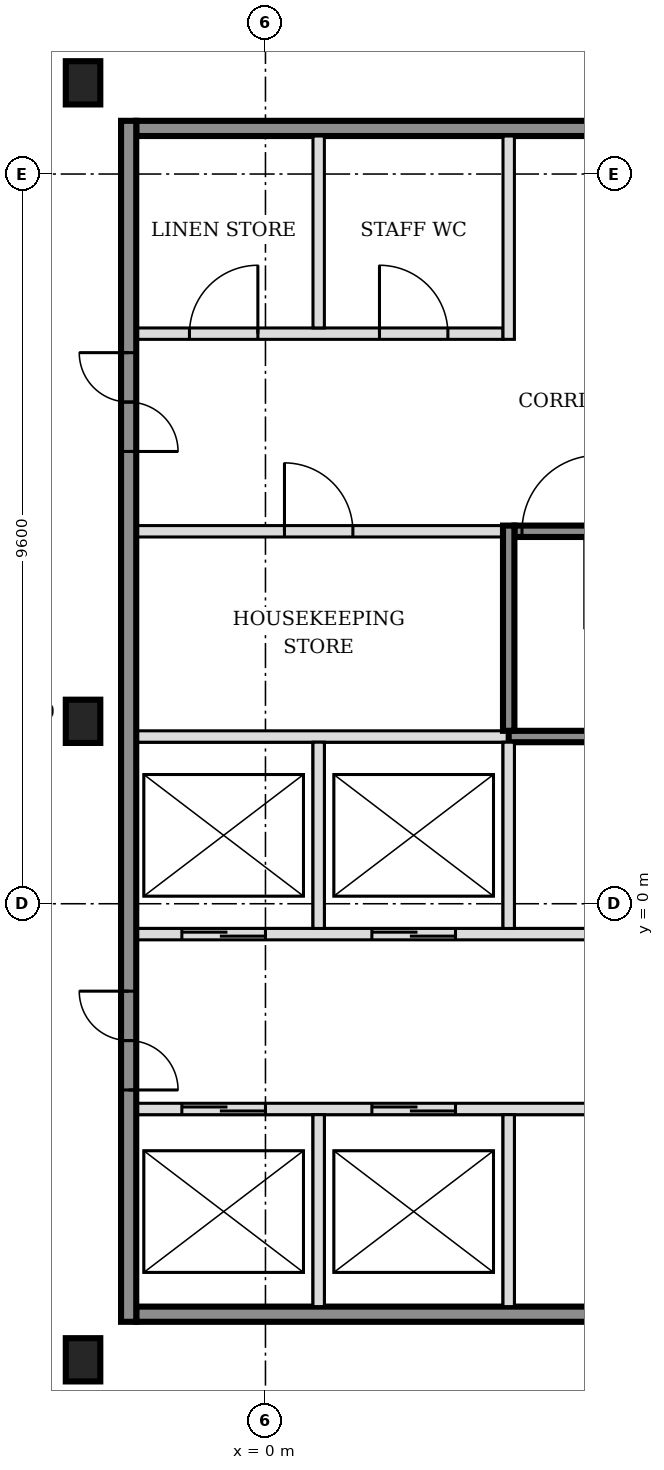
"""IFC4 building model, lengths in metres.
Left out: names, types, materials, properties, quantities, classifications, styles, units other than length and angle.
Written with IfcOpenShell. Run it as: python <this file> out.ifc"""

import sys

from ifc_helpers import new_model, si_unit, direction, frame, frame_2d, origin, origin_2d, place, context, subcontext, project, spatial, rectangle, i_section, extrude, element, fill, save


model = new_model("IFC4")
c1 = context("Model", 3, precision=1e-05, world=origin(), true_north=direction((0.0, 1.0)))
c2 = subcontext(c1, "Body", "Model", "MODEL_VIEW")
j1 = project(units=[si_unit("LENGTHUNIT", "METRE"), si_unit("PLANEANGLEUNIT", "RADIAN")], contexts=[c1])
p1 = place(None, origin())
s1 = spatial("IfcSite", under=j1, at=p1, CompositionType="ELEMENT")
p2 = place(p1, origin())
s2 = spatial("IfcBuilding", under=s1, at=p2, CompositionType="ELEMENT")
p3 = place(p2, frame((0.0, 0.0, 58.2)))
s3 = spatial("IfcBuildingStorey", under=s2, at=p3, CompositionType="ELEMENT", Elevation=58.2)
for number, where, z_axis, x_axis in (
    (1, (-2.4, -6.0, -0.15), (0.0, 0.0, 1.0), (1.0, 0.0, 0.0)),
    (2, (-2.4, 2.4, -0.15), (0.0, 0.0, 1.0), (1.0, 0.0, 0.0)),
    (3, (-2.4, 10.8, -0.15), (0.0, 0.0, 1.0), (1.0, 0.0, 0.0)),
):
    element("IfcColumn", number, at=place(p3, frame(where, z_axis=z_axis, x_axis=x_axis)), inside=s3, PredefinedType="COLUMN", context=c2, shape_type="SweptSolid", body=[
        extrude(i_section(OverallWidth=0.454, OverallDepth=0.569, WebThickness=0.078, FlangeThickness=0.125, FilletRadius=0.015, at=origin_2d()), origin(), (0.0, 0.0, 1.0), 3.6),
    ])
p4 = place(p3, frame((-1.7, -5.4, 0.0), z_axis=(0.0, 0.0, 1.0), x_axis=(1.0, 0.0, 0.0)))
e4 = element("IfcWall", 4, at=p4, inside=s3, PredefinedType="SOLIDWALL", context=c2, shape_type="SweptSolid", body=[
    extrude(rectangle(XDim=7.9, YDim=0.2, at=frame_2d((3.95, 0.0))), origin(), (0.0, 0.0, 1.0), 3.45),
])
p5 = place(p3, frame((-1.7, -2.7, 0.0), z_axis=(0.0, 0.0, 1.0), x_axis=(1.0, 0.0, 0.0)))
e5 = element("IfcWall", 5, at=p5, inside=s3, PredefinedType="SOLIDWALL", context=c2, shape_type="SweptSolid", body=[
    extrude(rectangle(XDim=7.9, YDim=0.15, at=frame_2d((3.95, 0.0))), origin(), (0.0, 0.0, 1.0), 3.45),
])
p6 = place(p5, frame((0.6, 0.0, 0.0)))
e6 = element("IfcOpeningElement", 6, at=p6, cuts=e5, PredefinedType="OPENING", context=c2, shape_type="SweptSolid", body=[
    extrude(rectangle(XDim=1.1, YDim=2.1, at=frame_2d((0.55, 1.05))), frame((0.0, 0.085, 0.0), z_axis=(0.0, -1.0, 0.0), x_axis=(1.0, 0.0, 0.0)), (0.0, 0.0, 1.0), 0.17),
])
p7 = place(p5, frame((3.1, 0.0, 0.0)))
e7 = element("IfcOpeningElement", 7, at=p7, cuts=e5, PredefinedType="OPENING", context=c2, shape_type="SweptSolid", body=[
    extrude(rectangle(XDim=1.1, YDim=2.1, at=frame_2d((0.55, 1.05))), frame((0.0, 0.085, 0.0), z_axis=(0.0, -1.0, 0.0), x_axis=(1.0, 0.0, 0.0)), (0.0, 0.0, 1.0), 0.17),
])
p8 = place(p3, frame((-1.7, -0.4, 0.0), z_axis=(0.0, 0.0, 1.0), x_axis=(1.0, 0.0, 0.0)))
e8 = element("IfcWall", 8, at=p8, inside=s3, PredefinedType="SOLIDWALL", context=c2, shape_type="SweptSolid", body=[
    extrude(rectangle(XDim=15.925, YDim=0.15, at=frame_2d((7.962, 0.0))), origin(), (0.0, 0.0, 1.0), 3.45),
])
p9 = place(p8, frame((0.6, 0.0, 0.0)))
e9 = element("IfcOpeningElement", 9, at=p9, cuts=e8, PredefinedType="OPENING", context=c2, shape_type="SweptSolid", body=[
    extrude(rectangle(XDim=1.1, YDim=2.1, at=frame_2d((0.55, 1.05))), frame((0.0, 0.085, 0.0), z_axis=(0.0, -1.0, 0.0), x_axis=(1.0, 0.0, 0.0)), (0.0, 0.0, 1.0), 0.17),
])
p10 = place(p8, frame((3.1, 0.0, 0.0)))
e10 = element("IfcOpeningElement", 10, at=p10, cuts=e8, PredefinedType="OPENING", context=c2, shape_type="SweptSolid", body=[
    extrude(rectangle(XDim=1.1, YDim=2.1, at=frame_2d((0.55, 1.05))), frame((0.0, 0.085, 0.0), z_axis=(0.0, -1.0, 0.0), x_axis=(1.0, 0.0, 0.0)), (0.0, 0.0, 1.0), 0.17),
])
p11 = place(p8, frame((11.575, 0.0, 0.0)))
e11 = element("IfcOpeningElement", 11, at=p11, cuts=e8, PredefinedType="OPENING", context=c2, shape_type="SweptSolid", body=[
    extrude(rectangle(XDim=1.2, YDim=2.1, at=frame_2d((0.6, 1.05))), frame((0.0, 0.085, 0.0), z_axis=(0.0, -1.0, 0.0), x_axis=(1.0, 0.0, 0.0)), (0.0, 0.0, 1.0), 0.17),
])
p12 = place(p8, frame((14.125, 0.0, 0.0)))
e12 = element("IfcOpeningElement", 12, at=p12, cuts=e8, PredefinedType="OPENING", context=c2, shape_type="SweptSolid", body=[
    extrude(rectangle(XDim=1.2, YDim=2.1, at=frame_2d((0.6, 1.05))), frame((0.0, 0.085, 0.0), z_axis=(0.0, -1.0, 0.0), x_axis=(1.0, 0.0, 0.0)), (0.0, 0.0, 1.0), 0.17),
])
p13 = place(p3, frame((-1.7, 2.2, 0.0), z_axis=(0.0, 0.0, 1.0), x_axis=(1.0, 0.0, 0.0)))
e13 = element("IfcWall", 13, at=p13, inside=s3, PredefinedType="SOLIDWALL", context=c2, shape_type="SweptSolid", body=[
    extrude(rectangle(XDim=4.9, YDim=0.15, at=frame_2d((2.45, 0.0))), origin(), (0.0, 0.0, 1.0), 3.45),
])
p14 = place(p3, frame((3.2, 2.2, 0.0), z_axis=(0.0, 0.0, 1.0), x_axis=(1.0, 0.0, 0.0)))
e14 = element("IfcWall", 14, at=p14, inside=s3, PredefinedType="SOLIDWALL", context=c2, shape_type="SweptSolid", body=[
    extrude(rectangle(XDim=6.5, YDim=0.15, at=frame_2d((3.25, 0.0))), origin(), (0.0, 0.0, 1.0), 3.45),
])
p15 = place(p3, frame((-1.7, 4.9, 0.0), z_axis=(0.0, 0.0, 1.0), x_axis=(1.0, 0.0, 0.0)))
e15 = element("IfcWall", 15, at=p15, inside=s3, PredefinedType="PARTITIONING", context=c2, shape_type="SweptSolid", body=[
    extrude(rectangle(XDim=4.825, YDim=0.15, at=frame_2d((2.413, 0.0))), origin(), (0.0, 0.0, 1.0), 3.45),
])
p16 = place(p15, frame((1.95, 0.0, 0.0)))
e16 = element("IfcOpeningElement", 16, at=p16, cuts=e15, PredefinedType="OPENING", context=c2, shape_type="SweptSolid", body=[
    extrude(rectangle(XDim=0.9, YDim=2.1, at=frame_2d((0.45, 1.05))), frame((0.0, 0.085, 0.0), z_axis=(0.0, -1.0, 0.0), x_axis=(1.0, 0.0, 0.0)), (0.0, 0.0, 1.0), 0.17),
])
p17 = place(p3, frame((3.275, 4.9, 0.0), z_axis=(0.0, 0.0, 1.0), x_axis=(1.0, 0.0, 0.0)))
e17 = element("IfcWall", 17, at=p17, inside=s3, PredefinedType="SOLIDWALL", context=c2, shape_type="SweptSolid", body=[
    extrude(rectangle(XDim=6.425, YDim=0.15, at=frame_2d((3.212, 0.0))), origin(), (0.0, 0.0, 1.0), 3.45),
])
p18 = place(p17, frame((0.1, 0.0, 0.0)))
e18 = element("IfcOpeningElement", 18, at=p18, cuts=e17, PredefinedType="OPENING", context=c2, shape_type="SweptSolid", body=[
    extrude(rectangle(XDim=1.0, YDim=2.1, at=frame_2d((0.5, 1.05))), frame((0.0, 0.085, 0.0), z_axis=(0.0, -1.0, 0.0), x_axis=(1.0, 0.0, 0.0)), (0.0, 0.0, 1.0), 0.17),
])
p19 = place(p3, frame((-1.7, 7.5, 0.0), z_axis=(0.0, 0.0, 1.0), x_axis=(1.0, 0.0, 0.0)))
e19 = element("IfcWall", 19, at=p19, inside=s3, PredefinedType="PARTITIONING", context=c2, shape_type="SweptSolid", body=[
    extrude(rectangle(XDim=4.825, YDim=0.15, at=frame_2d((2.413, 0.0))), origin(), (0.0, 0.0, 1.0), 3.45),
])
p20 = place(p19, frame((0.7, 0.0, 0.0)))
e20 = element("IfcOpeningElement", 20, at=p20, cuts=e19, PredefinedType="OPENING", context=c2, shape_type="SweptSolid", body=[
    extrude(rectangle(XDim=0.9, YDim=2.1, at=frame_2d((0.45, 1.05))), frame((0.0, 0.085, 0.0), z_axis=(0.0, -1.0, 0.0), x_axis=(1.0, 0.0, 0.0)), (0.0, 0.0, 1.0), 0.17),
])
p21 = place(p19, frame((3.2, 0.0, 0.0)))
e21 = element("IfcOpeningElement", 21, at=p21, cuts=e19, PredefinedType="OPENING", context=c2, shape_type="SweptSolid", body=[
    extrude(rectangle(XDim=0.9, YDim=2.1, at=frame_2d((0.45, 1.05))), frame((0.0, 0.085, 0.0), z_axis=(0.0, -1.0, 0.0), x_axis=(1.0, 0.0, 0.0)), (0.0, 0.0, 1.0), 0.17),
])
p22 = place(p3, frame((-1.7, 10.2, 0.0), z_axis=(0.0, 0.0, 1.0), x_axis=(1.0, 0.0, 0.0)))
e22 = element("IfcWall", 22, at=p22, inside=s3, PredefinedType="SOLIDWALL", context=c2, shape_type="SweptSolid", body=[
    extrude(rectangle(XDim=7.9, YDim=0.2, at=frame_2d((3.95, 0.0))), origin(), (0.0, 0.0, 1.0), 3.45),
])
p23 = place(p3, frame((-1.8, -5.5, 0.0), z_axis=(0.0, 0.0, 1.0), x_axis=(0.0, 1.0, 0.0)))
e23 = element("IfcWall", 23, at=p23, inside=s3, PredefinedType="SOLIDWALL", context=c2, shape_type="SweptSolid", body=[
    extrude(rectangle(XDim=15.8, YDim=0.2, at=frame_2d((7.9, 0.0))), origin(), (0.0, 0.0, 1.0), 3.45),
])
p24 = place(p23, frame((3.05, 0.0, 0.0)))
e24 = element("IfcOpeningElement", 24, at=p24, cuts=e23, PredefinedType="OPENING", context=c2, shape_type="SweptSolid", body=[
    extrude(rectangle(XDim=1.3, YDim=2.1, at=frame_2d((0.65, 1.05))), frame((0.0, 0.11, 0.0), z_axis=(0.0, -1.0, 0.0), x_axis=(1.0, 0.0, 0.0)), (0.0, 0.0, 1.0), 0.22),
])
p25 = place(p23, frame((11.45, 0.0, 0.0)))
e25 = element("IfcOpeningElement", 25, at=p25, cuts=e23, PredefinedType="OPENING", context=c2, shape_type="SweptSolid", body=[
    extrude(rectangle(XDim=1.3, YDim=2.1, at=frame_2d((0.65, 1.05))), frame((0.0, 0.11, 0.0), z_axis=(0.0, -1.0, 0.0), x_axis=(1.0, 0.0, 0.0)), (0.0, 0.0, 1.0), 0.22),
])
p26 = place(p3, frame((0.7, -5.3, 0.0), z_axis=(0.0, 0.0, 1.0), x_axis=(0.0, 1.0, 0.0)))
e26 = element("IfcWall", 26, at=p26, inside=s3, PredefinedType="SOLIDWALL", context=c2, shape_type="SweptSolid", body=[
    extrude(rectangle(XDim=2.525, YDim=0.15, at=frame_2d((1.263, 0.0))), origin(), (0.0, 0.0, 1.0), 3.45),
])
p27 = place(p3, frame((0.7, -0.325, 0.0), z_axis=(0.0, 0.0, 1.0), x_axis=(0.0, 1.0, 0.0)))
e27 = element("IfcWall", 27, at=p27, inside=s3, PredefinedType="SOLIDWALL", context=c2, shape_type="SweptSolid", body=[
    extrude(rectangle(XDim=2.45, YDim=0.15, at=frame_2d((1.225, 0.0))), origin(), (0.0, 0.0, 1.0), 3.45),
])
p28 = place(p3, frame((0.7, 7.575, 0.0), z_axis=(0.0, 0.0, 1.0), x_axis=(0.0, 1.0, 0.0)))
e28 = element("IfcWall", 28, at=p28, inside=s3, PredefinedType="PARTITIONING", context=c2, shape_type="SweptSolid", body=[
    extrude(rectangle(XDim=2.525, YDim=0.15, at=frame_2d((1.263, 0.0))), origin(), (0.0, 0.0, 1.0), 3.45),
])
p29 = place(p3, frame((3.2, -5.3, 0.0), z_axis=(0.0, 0.0, 1.0), x_axis=(0.0, 1.0, 0.0)))
e29 = element("IfcWall", 29, at=p29, inside=s3, PredefinedType="SOLIDWALL", context=c2, shape_type="SweptSolid", body=[
    extrude(rectangle(XDim=2.525, YDim=0.15, at=frame_2d((1.263, 0.0))), origin(), (0.0, 0.0, 1.0), 3.45),
])
p30 = place(p3, frame((3.2, -0.325, 0.0), z_axis=(0.0, 0.0, 1.0), x_axis=(0.0, 1.0, 0.0)))
e30 = element("IfcWall", 30, at=p30, inside=s3, PredefinedType="SOLIDWALL", context=c2, shape_type="SweptSolid", body=[
    extrude(rectangle(XDim=2.45, YDim=0.15, at=frame_2d((1.225, 0.0))), origin(), (0.0, 0.0, 1.0), 3.45),
])
p31 = place(p3, frame((3.2, 2.275, 0.0), z_axis=(0.0, 0.0, 1.0), x_axis=(0.0, 1.0, 0.0)))
e31 = element("IfcWall", 31, at=p31, inside=s3, PredefinedType="SOLIDWALL", context=c2, shape_type="SweptSolid", body=[
    extrude(rectangle(XDim=2.7, YDim=0.15, at=frame_2d((1.35, 0.0))), origin(), (0.0, 0.0, 1.0), 3.45),
])
p32 = place(p3, frame((3.2, 7.425, 0.0), z_axis=(0.0, 0.0, 1.0), x_axis=(0.0, 1.0, 0.0)))
e32 = element("IfcWall", 32, at=p32, inside=s3, PredefinedType="PARTITIONING", context=c2, shape_type="SweptSolid", body=[
    extrude(rectangle(XDim=2.675, YDim=0.15, at=frame_2d((1.337, 0.0))), origin(), (0.0, 0.0, 1.0), 3.45),
])
p33 = place(p6, origin())
e33 = element("IfcDoor", 33, at=p33, inside=s3, OperationType="DOUBLE_DOOR_SLIDING", PredefinedType="DOOR", context=c2, shape_type="SweptSolid", body=[
    extrude(rectangle(XDim=1.1, YDim=2.1, at=frame_2d((0.55, 1.05))), frame((0.0, 0.025, 0.0), z_axis=(0.0, -1.0, 0.0), x_axis=(1.0, 0.0, 0.0)), (0.0, 0.0, 1.0), 0.05),
])
fill(e6, e33)
p34 = place(p7, origin())
e34 = element("IfcDoor", 34, at=p34, inside=s3, OperationType="DOUBLE_DOOR_SLIDING", PredefinedType="DOOR", context=c2, shape_type="SweptSolid", body=[
    extrude(rectangle(XDim=1.1, YDim=2.1, at=frame_2d((0.55, 1.05))), frame((0.0, 0.025, 0.0), z_axis=(0.0, -1.0, 0.0), x_axis=(1.0, 0.0, 0.0)), (0.0, 0.0, 1.0), 0.05),
])
fill(e7, e34)
p35 = place(p9, origin())
e35 = element("IfcDoor", 35, at=p35, inside=s3, OperationType="DOUBLE_DOOR_SLIDING", PredefinedType="DOOR", context=c2, shape_type="SweptSolid", body=[
    extrude(rectangle(XDim=1.1, YDim=2.1, at=frame_2d((0.55, 1.05))), frame((0.0, 0.025, 0.0), z_axis=(0.0, -1.0, 0.0), x_axis=(1.0, 0.0, 0.0)), (0.0, 0.0, 1.0), 0.05),
])
fill(e9, e35)
p36 = place(p10, origin())
e36 = element("IfcDoor", 36, at=p36, inside=s3, OperationType="DOUBLE_DOOR_SLIDING", PredefinedType="DOOR", context=c2, shape_type="SweptSolid", body=[
    extrude(rectangle(XDim=1.1, YDim=2.1, at=frame_2d((0.55, 1.05))), frame((0.0, 0.025, 0.0), z_axis=(0.0, -1.0, 0.0), x_axis=(1.0, 0.0, 0.0)), (0.0, 0.0, 1.0), 0.05),
])
fill(e10, e36)
p37 = place(p18, origin())
e37 = element("IfcDoor", 37, at=p37, inside=s3, OperationType="SINGLE_SWING_RIGHT", PredefinedType="DOOR", context=c2, shape_type="SweptSolid", body=[
    extrude(rectangle(XDim=1.0, YDim=2.1, at=frame_2d((0.5, 1.05))), frame((0.0, 0.025, 0.0), z_axis=(0.0, -1.0, 0.0), x_axis=(1.0, 0.0, 0.0)), (0.0, 0.0, 1.0), 0.05),
])
fill(e18, e37)
p38 = place(p24, origin())
e38 = element("IfcDoor", 38, at=p38, inside=s3, OperationType="DOUBLE_DOOR_SINGLE_SWING", PredefinedType="DOOR", context=c2, shape_type="SweptSolid", body=[
    extrude(rectangle(XDim=1.3, YDim=2.1, at=frame_2d((0.65, 1.05))), frame((0.0, 0.025, 0.0), z_axis=(0.0, -1.0, 0.0), x_axis=(1.0, 0.0, 0.0)), (0.0, 0.0, 1.0), 0.05),
])
fill(e24, e38)
p39 = place(p25, origin())
e39 = element("IfcDoor", 39, at=p39, inside=s3, OperationType="DOUBLE_DOOR_SINGLE_SWING", PredefinedType="DOOR", context=c2, shape_type="SweptSolid", body=[
    extrude(rectangle(XDim=1.3, YDim=2.1, at=frame_2d((0.65, 1.05))), frame((0.0, 0.025, 0.0), z_axis=(0.0, -1.0, 0.0), x_axis=(1.0, 0.0, 0.0)), (0.0, 0.0, 1.0), 0.05),
])
fill(e25, e39)
p40 = place(p16, origin())
e40 = element("IfcDoor", 40, at=p40, inside=s3, OperationType="SINGLE_SWING_LEFT", PredefinedType="DOOR", context=c2, shape_type="SweptSolid", body=[
    extrude(rectangle(XDim=0.9, YDim=2.1, at=frame_2d((0.45, 1.05))), frame((0.0, 0.025, 0.0), z_axis=(0.0, -1.0, 0.0), x_axis=(1.0, 0.0, 0.0)), (0.0, 0.0, 1.0), 0.05),
])
fill(e16, e40)
p41 = place(p20, origin())
e41 = element("IfcDoor", 41, at=p41, inside=s3, OperationType="SINGLE_SWING_RIGHT", PredefinedType="DOOR", context=c2, shape_type="SweptSolid", body=[
    extrude(rectangle(XDim=0.9, YDim=2.1, at=frame_2d((0.45, 1.05))), frame((0.0, 0.025, 0.0), z_axis=(0.0, -1.0, 0.0), x_axis=(1.0, 0.0, 0.0)), (0.0, 0.0, 1.0), 0.05),
])
fill(e20, e41)
p42 = place(p21, origin())
e42 = element("IfcDoor", 42, at=p42, inside=s3, OperationType="SINGLE_SWING_LEFT", PredefinedType="DOOR", context=c2, shape_type="SweptSolid", body=[
    extrude(rectangle(XDim=0.9, YDim=2.1, at=frame_2d((0.45, 1.05))), frame((0.0, 0.025, 0.0), z_axis=(0.0, -1.0, 0.0), x_axis=(1.0, 0.0, 0.0)), (0.0, 0.0, 1.0), 0.05),
])
fill(e21, e42)
save(model, sys.argv[1])
